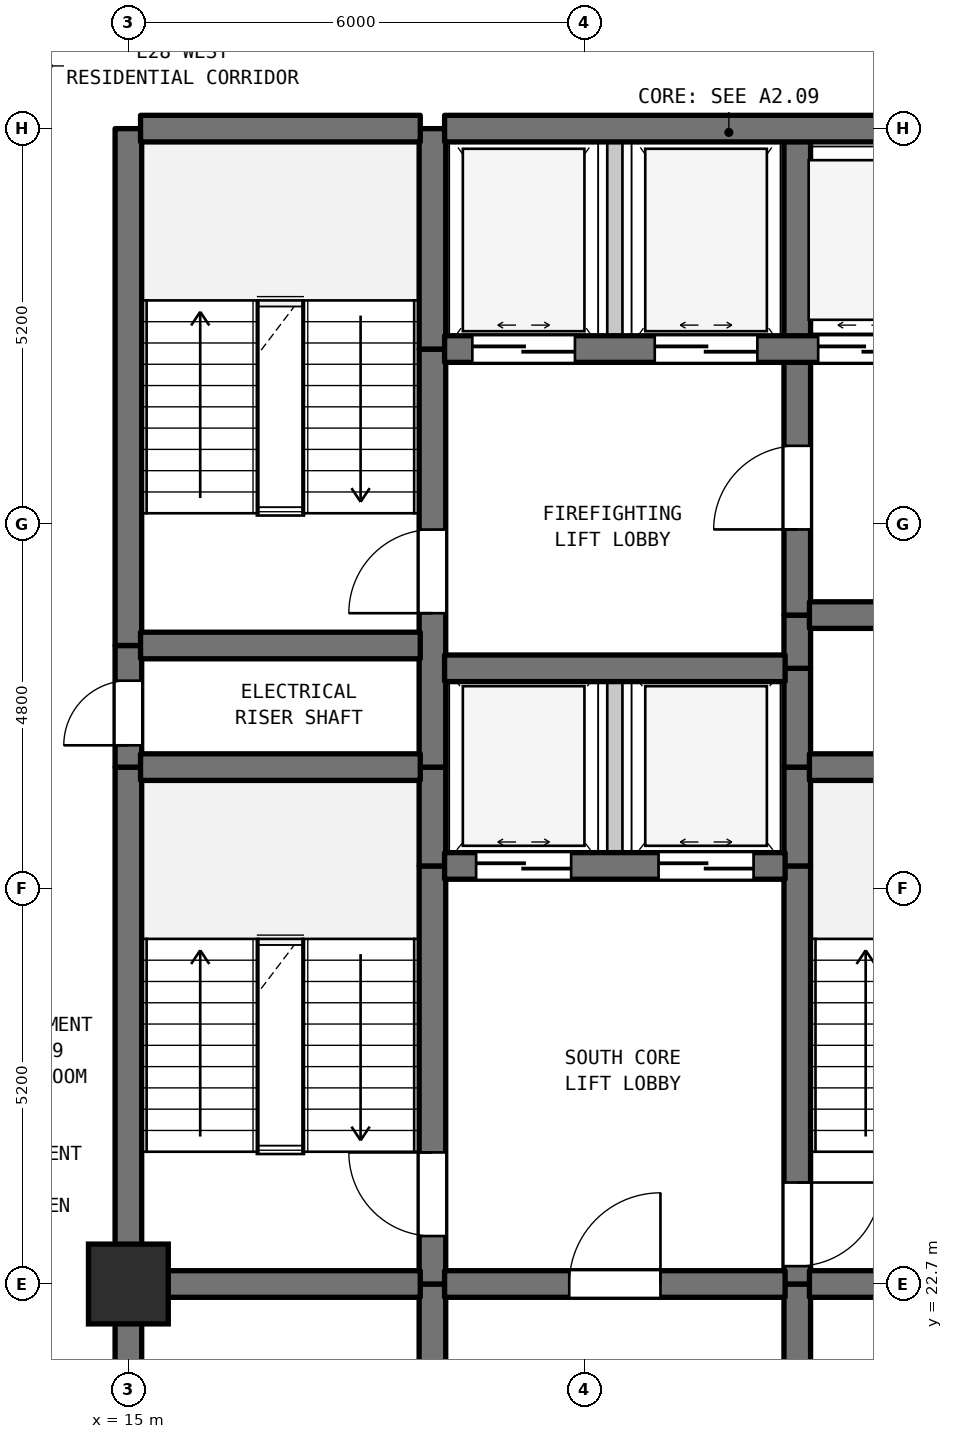
"""IFC4 building model, lengths in metres.
Left out: names, types, materials, properties, quantities, classifications, styles, units other than length and angle.
Written with IfcOpenShell. Run it as: python <this file> out.ifc"""

import sys

from ifc_helpers import new_model, si_unit, direction, frame, frame_2d, origin, origin_2d, place, context, subcontext, project, spatial, rectangle, extrude, element, fill, save


model = new_model("IFC4")
c1 = context("Model", 3, precision=1e-05, world=origin(), true_north=direction((0.0, 1.0)))
c2 = subcontext(c1, "Body", "Model", "MODEL_VIEW")
j1 = project(units=[si_unit("LENGTHUNIT", "METRE"), si_unit("PLANEANGLEUNIT", "RADIAN")], contexts=[c1])
p1 = place(None, origin())
s1 = spatial("IfcSite", under=j1, at=p1, CompositionType="ELEMENT")
p2 = place(p1, origin())
s2 = spatial("IfcBuilding", under=s1, at=p2, CompositionType="ELEMENT")
p3 = place(p2, frame((0.0, 0.0, 116.8)))
s3 = spatial("IfcBuildingStorey", under=s2, at=p3, CompositionType="ELEMENT", Elevation=116.8)
p4 = place(p3, frame((15.0, 22.7, 0.0), z_axis=(0.0, 0.0, 1.0), x_axis=(1.0, 0.0, 0.0)))
e1 = element("IfcColumn", 1, at=p4, inside=s3, PredefinedType="COLUMN", context=c2, shape_type="SweptSolid", body=[
    extrude(rectangle(XDim=1.05, YDim=1.05, at=origin_2d()), origin(), (0.0, 0.0, 1.0), 3.7),
])
p5 = place(p3, frame((15.0, 19.5, 0.0), z_axis=(0.0, 0.0, 1.0), x_axis=(0.0, 1.0, 0.0)))
e2 = element("IfcWall", 2, at=p5, inside=s3, PredefinedType="SHEAR", context=c2, shape_type="SweptSolid", body=[
    extrude(rectangle(XDim=3.2, YDim=0.35, at=frame_2d((1.6, 0.0))), origin(), (0.0, 0.0, 1.0), 3.38),
])
p6 = place(p3, frame((15.0, 22.7, 0.0), z_axis=(0.0, 0.0, 1.0), x_axis=(0.0, 1.0, 0.0)))
e3 = element("IfcWall", 3, at=p6, inside=s3, PredefinedType="SHEAR", context=c2, shape_type="SweptSolid", body=[
    extrude(rectangle(XDim=6.8, YDim=0.35, at=frame_2d((3.4, 0.0))), origin(), (0.0, 0.0, 1.0), 3.38),
])
p7 = place(p3, frame((15.0, 29.5, 0.0), z_axis=(0.0, 0.0, 1.0), x_axis=(0.0, 1.0, 0.0)))
e4 = element("IfcWall", 4, at=p7, inside=s3, PredefinedType="SHEAR", context=c2, shape_type="SweptSolid", body=[
    extrude(rectangle(XDim=1.6, YDim=0.35, at=frame_2d((0.8, 0.0))), origin(), (0.0, 0.0, 1.0), 3.38),
])
p8 = place(p7, frame((0.287, 0.0, 0.0)))
e5 = element("IfcOpeningElement", 5, at=p8, cuts=e4, PredefinedType="OPENING", context=c2, shape_type="SweptSolid", body=[
    extrude(rectangle(XDim=0.85, YDim=2.1, at=frame_2d((0.425, 1.05))), frame((0.0, 0.185, 0.0), z_axis=(0.0, -1.0, 0.0), x_axis=(1.0, 0.0, 0.0)), (0.0, 0.0, 1.0), 0.37),
])
p9 = place(p3, frame((15.0, 31.1, 0.0), z_axis=(0.0, 0.0, 1.0), x_axis=(0.0, 1.0, 0.0)))
e6 = element("IfcWall", 6, at=p9, inside=s3, PredefinedType="SHEAR", context=c2, shape_type="SweptSolid", body=[
    extrude(rectangle(XDim=6.8, YDim=0.35, at=frame_2d((3.4, 0.0))), origin(), (0.0, 0.0, 1.0), 3.38),
])
p10 = place(p3, frame((19.0, 19.5, 0.0), z_axis=(0.0, 0.0, 1.0), x_axis=(0.0, 1.0, 0.0)))
e7 = element("IfcWall", 7, at=p10, inside=s3, PredefinedType="SHEAR", context=c2, shape_type="SweptSolid", body=[
    extrude(rectangle(XDim=3.2, YDim=0.35, at=frame_2d((1.6, 0.0))), origin(), (0.0, 0.0, 1.0), 3.38),
])
p11 = place(p3, frame((19.0, 22.7, 0.0), z_axis=(0.0, 0.0, 1.0), x_axis=(0.0, 1.0, 0.0)))
e8 = element("IfcWall", 8, at=p11, inside=s3, PredefinedType="SHEAR", context=c2, shape_type="SweptSolid", body=[
    extrude(rectangle(XDim=5.5, YDim=0.35, at=frame_2d((2.75, 0.0))), origin(), (0.0, 0.0, 1.0), 3.38),
])
p12 = place(p11, frame((0.631, 0.0, 0.0)))
e9 = element("IfcOpeningElement", 9, at=p12, cuts=e8, PredefinedType="OPENING", context=c2, shape_type="SweptSolid", body=[
    extrude(rectangle(XDim=1.1, YDim=2.15, at=frame_2d((0.55, 1.075))), frame((0.0, 0.185, 0.0), z_axis=(0.0, -1.0, 0.0), x_axis=(1.0, 0.0, 0.0)), (0.0, 0.0, 1.0), 0.37),
])
p13 = place(p3, frame((19.0, 28.2, 0.0), z_axis=(0.0, 0.0, 1.0), x_axis=(0.0, 1.0, 0.0)))
e10 = element("IfcWall", 10, at=p13, inside=s3, PredefinedType="SHEAR", context=c2, shape_type="SweptSolid", body=[
    extrude(rectangle(XDim=1.3, YDim=0.35, at=frame_2d((0.65, 0.0))), origin(), (0.0, 0.0, 1.0), 3.38),
])
p14 = place(p3, frame((19.0, 29.5, 0.0), z_axis=(0.0, 0.0, 1.0), x_axis=(0.0, 1.0, 0.0)))
e11 = element("IfcWall", 11, at=p14, inside=s3, PredefinedType="SHEAR", context=c2, shape_type="SweptSolid", body=[
    extrude(rectangle(XDim=5.5, YDim=0.35, at=frame_2d((2.75, 0.0))), origin(), (0.0, 0.0, 1.0), 3.38),
])
p15 = place(p14, frame((2.025, 0.0, 0.0)))
e12 = element("IfcOpeningElement", 12, at=p15, cuts=e11, PredefinedType="OPENING", context=c2, shape_type="SweptSolid", body=[
    extrude(rectangle(XDim=1.1, YDim=2.15, at=frame_2d((0.55, 1.075))), frame((0.0, 0.185, 0.0), z_axis=(0.0, -1.0, 0.0), x_axis=(1.0, 0.0, 0.0)), (0.0, 0.0, 1.0), 0.37),
])
p16 = place(p3, frame((19.0, 35.0, 0.0), z_axis=(0.0, 0.0, 1.0), x_axis=(0.0, 1.0, 0.0)))
e13 = element("IfcWall", 13, at=p16, inside=s3, PredefinedType="SHEAR", context=c2, shape_type="SweptSolid", body=[
    extrude(rectangle(XDim=2.9, YDim=0.35, at=frame_2d((1.45, 0.0))), origin(), (0.0, 0.0, 1.0), 3.38),
])
p17 = place(p3, frame((21.4, 28.2, 0.0), z_axis=(0.0, 0.0, 1.0), x_axis=(0.0, 1.0, 0.0)))
e14 = element("IfcWall", 14, at=p17, inside=s3, PredefinedType="STANDARD", context=c2, shape_type="SweptSolid", body=[
    extrude(rectangle(XDim=2.6, YDim=0.2, at=frame_2d((1.3, 0.0))), origin(), (0.0, 0.0, 1.0), 3.38),
])
p18 = place(p3, frame((21.4, 35.0, 0.0), z_axis=(0.0, 0.0, 1.0), x_axis=(0.0, 1.0, 0.0)))
e15 = element("IfcWall", 15, at=p18, inside=s3, PredefinedType="STANDARD", context=c2, shape_type="SweptSolid", body=[
    extrude(rectangle(XDim=2.9, YDim=0.2, at=frame_2d((1.45, 0.0))), origin(), (0.0, 0.0, 1.0), 3.38),
])
p19 = place(p3, frame((23.8, 19.5, 0.0), z_axis=(0.0, 0.0, 1.0), x_axis=(0.0, 1.0, 0.0)))
e16 = element("IfcWall", 16, at=p19, inside=s3, PredefinedType="SHEAR", context=c2, shape_type="SweptSolid", body=[
    extrude(rectangle(XDim=3.2, YDim=0.35, at=frame_2d((1.6, 0.0))), origin(), (0.0, 0.0, 1.0), 3.38),
])
p20 = place(p3, frame((23.8, 22.7, 0.0), z_axis=(0.0, 0.0, 1.0), x_axis=(0.0, 1.0, 0.0)))
e17 = element("IfcWall", 17, at=p20, inside=s3, PredefinedType="SHEAR", context=c2, shape_type="SweptSolid", body=[
    extrude(rectangle(XDim=5.5, YDim=0.35, at=frame_2d((2.75, 0.0))), origin(), (0.0, 0.0, 1.0), 3.38),
])
p21 = place(p20, frame((0.235, 0.0, 0.0)))
e18 = element("IfcOpeningElement", 18, at=p21, cuts=e17, PredefinedType="OPENING", context=c2, shape_type="SweptSolid", body=[
    extrude(rectangle(XDim=1.1, YDim=2.15, at=frame_2d((0.55, 1.075))), frame((0.0, 0.185, 0.0), z_axis=(0.0, -1.0, 0.0), x_axis=(1.0, 0.0, 0.0)), (0.0, 0.0, 1.0), 0.37),
])
for number, where, z_axis, x_axis in (
    (19, (23.8, 28.2, 0.0), (0.0, 0.0, 1.0), (0.0, 1.0, 0.0)),
    (20, (23.8, 29.5, 0.0), (0.0, 0.0, 1.0), (0.0, 1.0, 0.0)),
):
    element("IfcWall", number, at=place(p3, frame(where, z_axis=z_axis, x_axis=x_axis)), inside=s3, PredefinedType="SHEAR", context=c2, shape_type="SweptSolid", body=[
        extrude(rectangle(XDim=1.3, YDim=0.35, at=frame_2d((0.65, 0.0))), origin(), (0.0, 0.0, 1.0), 3.38),
    ])
p22 = place(p3, frame((23.8, 30.8, 0.0), z_axis=(0.0, 0.0, 1.0), x_axis=(0.0, 1.0, 0.0)))
e21 = element("IfcWall", 21, at=p22, inside=s3, PredefinedType="SHEAR", context=c2, shape_type="SweptSolid", body=[
    extrude(rectangle(XDim=0.7, YDim=0.35, at=frame_2d((0.35, 0.0))), origin(), (0.0, 0.0, 1.0), 3.38),
])
p23 = place(p3, frame((23.8, 31.5, 0.0), z_axis=(0.0, 0.0, 1.0), x_axis=(0.0, 1.0, 0.0)))
e22 = element("IfcWall", 22, at=p23, inside=s3, PredefinedType="SHEAR", context=c2, shape_type="SweptSolid", body=[
    extrude(rectangle(XDim=3.5, YDim=0.35, at=frame_2d((1.75, 0.0))), origin(), (0.0, 0.0, 1.0), 3.38),
])
p24 = place(p23, frame((1.127, 0.0, 0.0)))
e23 = element("IfcOpeningElement", 23, at=p24, cuts=e22, PredefinedType="OPENING", context=c2, shape_type="SweptSolid", body=[
    extrude(rectangle(XDim=1.1, YDim=2.15, at=frame_2d((0.55, 1.075))), frame((0.0, 0.185, 0.0), z_axis=(0.0, -1.0, 0.0), x_axis=(1.0, 0.0, 0.0)), (0.0, 0.0, 1.0), 0.37),
])
p25 = place(p3, frame((23.8, 35.0, 0.0), z_axis=(0.0, 0.0, 1.0), x_axis=(0.0, 1.0, 0.0)))
e24 = element("IfcWall", 24, at=p25, inside=s3, PredefinedType="SHEAR", context=c2, shape_type="SweptSolid", body=[
    extrude(rectangle(XDim=2.9, YDim=0.35, at=frame_2d((1.45, 0.0))), origin(), (0.0, 0.0, 1.0), 3.38),
])
p26 = place(p3, frame((15.16, 22.7, 0.0), z_axis=(0.0, 0.0, 1.0), x_axis=(1.0, 0.0, 0.0)))
e25 = element("IfcWall", 25, at=p26, inside=s3, PredefinedType="SHEAR", context=c2, shape_type="SweptSolid", body=[
    extrude(rectangle(XDim=3.68, YDim=0.35, at=frame_2d((1.84, 0.0))), origin(), (0.0, 0.0, 1.0), 3.38),
])
p27 = place(p3, frame((19.16, 22.7, 0.0), z_axis=(0.0, 0.0, 1.0), x_axis=(1.0, 0.0, 0.0)))
e26 = element("IfcWall", 26, at=p27, inside=s3, PredefinedType="SHEAR", context=c2, shape_type="SweptSolid", body=[
    extrude(rectangle(XDim=4.48, YDim=0.35, at=frame_2d((2.24, 0.0))), origin(), (0.0, 0.0, 1.0), 3.38),
])
p28 = place(p27, frame((1.64, 0.0, 0.0)))
e27 = element("IfcOpeningElement", 27, at=p28, cuts=e26, PredefinedType="OPENING", context=c2, shape_type="SweptSolid", body=[
    extrude(rectangle(XDim=1.2, YDim=2.2, at=frame_2d((0.6, 1.1))), frame((0.0, 0.185, 0.0), z_axis=(0.0, -1.0, 0.0), x_axis=(1.0, 0.0, 0.0)), (0.0, 0.0, 1.0), 0.37),
])
p29 = place(p3, frame((23.96, 22.7, 0.0), z_axis=(0.0, 0.0, 1.0), x_axis=(1.0, 0.0, 0.0)))
e28 = element("IfcWall", 28, at=p29, inside=s3, PredefinedType="SHEAR", context=c2, shape_type="SweptSolid", body=[
    extrude(rectangle(XDim=1.855, YDim=0.35, at=frame_2d((0.927, 0.0))), origin(), (0.0, 0.0, 1.0), 3.38),
])
p30 = place(p3, frame((19.16, 28.2, 0.0), z_axis=(0.0, 0.0, 1.0), x_axis=(1.0, 0.0, 0.0)))
e29 = element("IfcWall", 29, at=p30, inside=s3, PredefinedType="SHEAR", context=c2, shape_type="SweptSolid", body=[
    extrude(rectangle(XDim=4.48, YDim=0.35, at=frame_2d((2.24, 0.0))), origin(), (0.0, 0.0, 1.0), 3.38),
])
p31 = place(p30, frame((0.415, 0.0, 0.0)))
e30 = element("IfcOpeningElement", 30, at=p31, cuts=e29, PredefinedType="OPENING", context=c2, shape_type="SweptSolid", body=[
    extrude(rectangle(XDim=1.25, YDim=2.2, at=frame_2d((0.625, 1.1))), frame((0.0, 0.185, 0.0), z_axis=(0.0, -1.0, 0.0), x_axis=(1.0, 0.0, 0.0)), (0.0, 0.0, 1.0), 0.37),
])
p32 = place(p30, frame((2.815, 0.0, 0.0)))
e31 = element("IfcOpeningElement", 31, at=p32, cuts=e29, PredefinedType="OPENING", context=c2, shape_type="SweptSolid", body=[
    extrude(rectangle(XDim=1.25, YDim=2.2, at=frame_2d((0.625, 1.1))), frame((0.0, 0.185, 0.0), z_axis=(0.0, -1.0, 0.0), x_axis=(1.0, 0.0, 0.0)), (0.0, 0.0, 1.0), 0.37),
])
p33 = place(p3, frame((15.16, 29.5, 0.0), z_axis=(0.0, 0.0, 1.0), x_axis=(1.0, 0.0, 0.0)))
e32 = element("IfcWall", 32, at=p33, inside=s3, PredefinedType="SHEAR", context=c2, shape_type="SweptSolid", body=[
    extrude(rectangle(XDim=3.68, YDim=0.35, at=frame_2d((1.84, 0.0))), origin(), (0.0, 0.0, 1.0), 3.38),
])
p34 = place(p3, frame((23.96, 29.5, 0.0), z_axis=(0.0, 0.0, 1.0), x_axis=(1.0, 0.0, 0.0)))
e33 = element("IfcWall", 33, at=p34, inside=s3, PredefinedType="SHEAR", context=c2, shape_type="SweptSolid", body=[
    extrude(rectangle(XDim=3.18, YDim=0.35, at=frame_2d((1.59, 0.0))), origin(), (0.0, 0.0, 1.0), 3.38),
])
p35 = place(p3, frame((19.16, 30.8, 0.0), z_axis=(0.0, 0.0, 1.0), x_axis=(1.0, 0.0, 0.0)))
e34 = element("IfcWall", 34, at=p35, inside=s3, PredefinedType="SHEAR", context=c2, shape_type="SweptSolid", body=[
    extrude(rectangle(XDim=4.48, YDim=0.35, at=frame_2d((2.24, 0.0))), origin(), (0.0, 0.0, 1.0), 3.38),
])
p36 = place(p3, frame((15.16, 31.1, 0.0), z_axis=(0.0, 0.0, 1.0), x_axis=(1.0, 0.0, 0.0)))
e35 = element("IfcWall", 35, at=p36, inside=s3, PredefinedType="SHEAR", context=c2, shape_type="SweptSolid", body=[
    extrude(rectangle(XDim=3.68, YDim=0.35, at=frame_2d((1.84, 0.0))), origin(), (0.0, 0.0, 1.0), 3.38),
])
p37 = place(p3, frame((23.96, 31.5, 0.0), z_axis=(0.0, 0.0, 1.0), x_axis=(1.0, 0.0, 0.0)))
e36 = element("IfcWall", 36, at=p37, inside=s3, PredefinedType="SHEAR", context=c2, shape_type="SweptSolid", body=[
    extrude(rectangle(XDim=3.18, YDim=0.35, at=frame_2d((1.59, 0.0))), origin(), (0.0, 0.0, 1.0), 3.38),
])
p38 = place(p37, frame((1.094, 0.0, 0.0)))
e37 = element("IfcOpeningElement", 37, at=p38, cuts=e36, PredefinedType="OPENING", context=c2, shape_type="SweptSolid", body=[
    extrude(rectangle(XDim=0.85, YDim=2.1, at=frame_2d((0.425, 1.05))), frame((0.0, 0.185, 0.0), z_axis=(0.0, -1.0, 0.0), x_axis=(1.0, 0.0, 0.0)), (0.0, 0.0, 1.0), 0.37),
])
p39 = place(p3, frame((19.16, 35.0, 0.0), z_axis=(0.0, 0.0, 1.0), x_axis=(1.0, 0.0, 0.0)))
e38 = element("IfcWall", 38, at=p39, inside=s3, PredefinedType="SHEAR", context=c2, shape_type="SweptSolid", body=[
    extrude(rectangle(XDim=11.48, YDim=0.35, at=frame_2d((5.74, 0.0))), origin(), (0.0, 0.0, 1.0), 3.38),
])
p40 = place(p39, frame((0.365, 0.0, 0.0)))
e39 = element("IfcOpeningElement", 39, at=p40, cuts=e38, PredefinedType="OPENING", context=c2, shape_type="SweptSolid", body=[
    extrude(rectangle(XDim=1.35, YDim=2.2, at=frame_2d((0.675, 1.1))), frame((0.0, 0.185, 0.0), z_axis=(0.0, -1.0, 0.0), x_axis=(1.0, 0.0, 0.0)), (0.0, 0.0, 1.0), 0.37),
])
p41 = place(p39, frame((2.765, 0.0, 0.0)))
e40 = element("IfcOpeningElement", 40, at=p41, cuts=e38, PredefinedType="OPENING", context=c2, shape_type="SweptSolid", body=[
    extrude(rectangle(XDim=1.35, YDim=2.2, at=frame_2d((0.675, 1.1))), frame((0.0, 0.185, 0.0), z_axis=(0.0, -1.0, 0.0), x_axis=(1.0, 0.0, 0.0)), (0.0, 0.0, 1.0), 0.37),
])
p42 = place(p39, frame((4.915, 0.0, 0.0)))
e41 = element("IfcOpeningElement", 41, at=p42, cuts=e38, PredefinedType="OPENING", context=c2, shape_type="SweptSolid", body=[
    extrude(rectangle(XDim=1.2, YDim=2.2, at=frame_2d((0.6, 1.1))), frame((0.0, 0.185, 0.0), z_axis=(0.0, -1.0, 0.0), x_axis=(1.0, 0.0, 0.0)), (0.0, 0.0, 1.0), 0.37),
])
p43 = place(p39, frame((6.665, 0.0, 0.0)))
e42 = element("IfcOpeningElement", 42, at=p43, cuts=e38, PredefinedType="OPENING", context=c2, shape_type="SweptSolid", body=[
    extrude(rectangle(XDim=1.2, YDim=2.2, at=frame_2d((0.6, 1.1))), frame((0.0, 0.185, 0.0), z_axis=(0.0, -1.0, 0.0), x_axis=(1.0, 0.0, 0.0)), (0.0, 0.0, 1.0), 0.37),
])
p44 = place(p39, frame((8.415, 0.0, 0.0)))
e43 = element("IfcOpeningElement", 43, at=p44, cuts=e38, PredefinedType="OPENING", context=c2, shape_type="SweptSolid", body=[
    extrude(rectangle(XDim=1.2, YDim=2.2, at=frame_2d((0.6, 1.1))), frame((0.0, 0.185, 0.0), z_axis=(0.0, -1.0, 0.0), x_axis=(1.0, 0.0, 0.0)), (0.0, 0.0, 1.0), 0.37),
])
p45 = place(p39, frame((10.16, 0.0, 0.0)))
e44 = element("IfcOpeningElement", 44, at=p45, cuts=e38, PredefinedType="OPENING", context=c2, shape_type="SweptSolid", body=[
    extrude(rectangle(XDim=1.2, YDim=2.2, at=frame_2d((0.6, 1.1))), frame((0.0, 0.185, 0.0), z_axis=(0.0, -1.0, 0.0), x_axis=(1.0, 0.0, 0.0)), (0.0, 0.0, 1.0), 0.37),
])
p46 = place(p3, frame((15.16, 37.9, 0.0), z_axis=(0.0, 0.0, 1.0), x_axis=(1.0, 0.0, 0.0)))
e45 = element("IfcWall", 45, at=p46, inside=s3, PredefinedType="SHEAR", context=c2, shape_type="SweptSolid", body=[
    extrude(rectangle(XDim=3.68, YDim=0.35, at=frame_2d((1.84, 0.0))), origin(), (0.0, 0.0, 1.0), 3.38),
])
p47 = place(p3, frame((19.16, 37.9, 0.0), z_axis=(0.0, 0.0, 1.0), x_axis=(1.0, 0.0, 0.0)))
e46 = element("IfcWall", 46, at=p47, inside=s3, PredefinedType="SHEAR", context=c2, shape_type="SweptSolid", body=[
    extrude(rectangle(XDim=11.48, YDim=0.35, at=frame_2d((5.74, 0.0))), origin(), (0.0, 0.0, 1.0), 3.38),
])
p48 = place(p8, origin())
e47 = element("IfcDoor", 47, at=p48, inside=s3, OperationType="SINGLE_SWING_LEFT", PredefinedType="DOOR", context=c2, shape_type="SweptSolid", body=[
    extrude(rectangle(XDim=0.85, YDim=2.1, at=frame_2d((0.425, 1.05))), frame((0.0, 0.025, 0.0), z_axis=(0.0, -1.0, 0.0), x_axis=(1.0, 0.0, 0.0)), (0.0, 0.0, 1.0), 0.05),
])
fill(e5, e47)
p49 = place(p12, origin())
e48 = element("IfcDoor", 48, at=p49, inside=s3, OperationType="SINGLE_SWING_RIGHT", PredefinedType="DOOR", context=c2, shape_type="SweptSolid", body=[
    extrude(rectangle(XDim=1.1, YDim=2.15, at=frame_2d((0.55, 1.075))), frame((0.0, 0.025, 0.0), z_axis=(0.0, -1.0, 0.0), x_axis=(1.0, 0.0, 0.0)), (0.0, 0.0, 1.0), 0.05),
])
fill(e9, e48)
p50 = place(p15, origin())
e49 = element("IfcDoor", 49, at=p50, inside=s3, OperationType="SINGLE_SWING_LEFT", PredefinedType="DOOR", context=c2, shape_type="SweptSolid", body=[
    extrude(rectangle(XDim=1.1, YDim=2.15, at=frame_2d((0.55, 1.075))), frame((0.0, 0.025, 0.0), z_axis=(0.0, -1.0, 0.0), x_axis=(1.0, 0.0, 0.0)), (0.0, 0.0, 1.0), 0.05),
])
fill(e12, e49)
p51 = place(p21, frame((1.1, 0.0, 0.0), z_axis=(0.0, 0.0, 1.0), x_axis=(-1.0, 0.0, 0.0)))
e50 = element("IfcDoor", 50, at=p51, inside=s3, OperationType="SINGLE_SWING_RIGHT", PredefinedType="DOOR", context=c2, shape_type="SweptSolid", body=[
    extrude(rectangle(XDim=1.1, YDim=2.15, at=frame_2d((0.55, 1.075))), frame((0.0, 0.025, 0.0), z_axis=(0.0, -1.0, 0.0), x_axis=(1.0, 0.0, 0.0)), (0.0, 0.0, 1.0), 0.05),
])
fill(e18, e50)
p52 = place(p24, origin())
e51 = element("IfcDoor", 51, at=p52, inside=s3, OperationType="SINGLE_SWING_LEFT", PredefinedType="DOOR", context=c2, shape_type="SweptSolid", body=[
    extrude(rectangle(XDim=1.1, YDim=2.15, at=frame_2d((0.55, 1.075))), frame((0.0, 0.025, 0.0), z_axis=(0.0, -1.0, 0.0), x_axis=(1.0, 0.0, 0.0)), (0.0, 0.0, 1.0), 0.05),
])
fill(e23, e51)
p53 = place(p28, origin())
e52 = element("IfcDoor", 52, at=p53, inside=s3, OperationType="SINGLE_SWING_RIGHT", PredefinedType="DOOR", context=c2, shape_type="SweptSolid", body=[
    extrude(rectangle(XDim=1.2, YDim=2.2, at=frame_2d((0.6, 1.1))), frame((0.0, 0.025, 0.0), z_axis=(0.0, -1.0, 0.0), x_axis=(1.0, 0.0, 0.0)), (0.0, 0.0, 1.0), 0.05),
])
fill(e27, e52)
p54 = place(p31, origin())
e53 = element("IfcDoor", 53, at=p54, inside=s3, OperationType="DOUBLE_DOOR_SLIDING", PredefinedType="DOOR", context=c2, shape_type="SweptSolid", body=[
    extrude(rectangle(XDim=1.25, YDim=2.2, at=frame_2d((0.625, 1.1))), frame((0.0, 0.025, 0.0), z_axis=(0.0, -1.0, 0.0), x_axis=(1.0, 0.0, 0.0)), (0.0, 0.0, 1.0), 0.05),
])
fill(e30, e53)
p55 = place(p32, origin())
e54 = element("IfcDoor", 54, at=p55, inside=s3, OperationType="DOUBLE_DOOR_SLIDING", PredefinedType="DOOR", context=c2, shape_type="SweptSolid", body=[
    extrude(rectangle(XDim=1.25, YDim=2.2, at=frame_2d((0.625, 1.1))), frame((0.0, 0.025, 0.0), z_axis=(0.0, -1.0, 0.0), x_axis=(1.0, 0.0, 0.0)), (0.0, 0.0, 1.0), 0.05),
])
fill(e31, e54)
p56 = place(p40, origin())
e55 = element("IfcDoor", 55, at=p56, inside=s3, OperationType="DOUBLE_DOOR_SLIDING", PredefinedType="DOOR", context=c2, shape_type="SweptSolid", body=[
    extrude(rectangle(XDim=1.35, YDim=2.2, at=frame_2d((0.675, 1.1))), frame((0.0, 0.025, 0.0), z_axis=(0.0, -1.0, 0.0), x_axis=(1.0, 0.0, 0.0)), (0.0, 0.0, 1.0), 0.05),
])
fill(e39, e55)
p57 = place(p41, origin())
e56 = element("IfcDoor", 56, at=p57, inside=s3, OperationType="DOUBLE_DOOR_SLIDING", PredefinedType="DOOR", context=c2, shape_type="SweptSolid", body=[
    extrude(rectangle(XDim=1.35, YDim=2.2, at=frame_2d((0.675, 1.1))), frame((0.0, 0.025, 0.0), z_axis=(0.0, -1.0, 0.0), x_axis=(1.0, 0.0, 0.0)), (0.0, 0.0, 1.0), 0.05),
])
fill(e40, e56)
p58 = place(p42, origin())
e57 = element("IfcDoor", 57, at=p58, inside=s3, OperationType="DOUBLE_DOOR_SLIDING", PredefinedType="DOOR", context=c2, shape_type="SweptSolid", body=[
    extrude(rectangle(XDim=1.2, YDim=2.2, at=frame_2d((0.6, 1.1))), frame((0.0, 0.025, 0.0), z_axis=(0.0, -1.0, 0.0), x_axis=(1.0, 0.0, 0.0)), (0.0, 0.0, 1.0), 0.05),
])
fill(e41, e57)
save(model, sys.argv[1])
